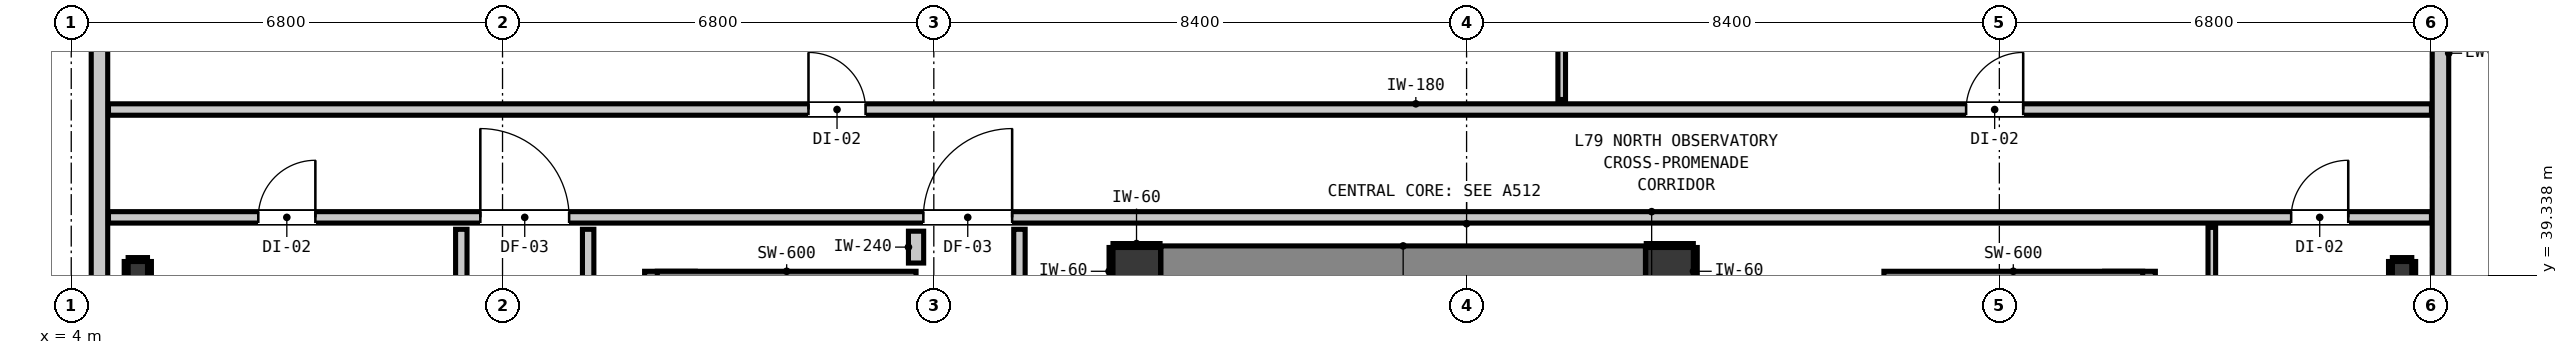
"""IFC4 building model, lengths in metres.
Left out: names, types, materials, properties, quantities, classifications, styles, units other than length and angle.
Written with IfcOpenShell. Run it as: python <this file> out.ifc"""

import sys

from ifc_helpers import new_model, si_unit, direction, frame, frame_2d, origin, origin_2d, place, context, subcontext, project, spatial, rectangle, i_section, extrude, element, fill, save


model = new_model("IFC4")
c1 = context("Model", 3, precision=1e-05, world=origin(), true_north=direction((0.0, 1.0)))
c2 = subcontext(c1, "Body", "Model", "MODEL_VIEW")
j1 = project(units=[si_unit("LENGTHUNIT", "METRE"), si_unit("PLANEANGLEUNIT", "RADIAN")], contexts=[c1])
p1 = place(None, origin())
s1 = spatial("IfcSite", under=j1, at=p1, CompositionType="ELEMENT")
p2 = place(p1, origin())
s2 = spatial("IfcBuilding", under=s1, at=p2, CompositionType="ELEMENT")
p3 = place(p2, frame((0.0, 0.0, 273.48)))
s3 = spatial("IfcBuildingStorey", under=s2, at=p3, CompositionType="ELEMENT", Elevation=273.48)
for number, where, z_axis, x_axis in (
    (1, (20.8, 39.4, 0.0), (0.0, 0.0, 1.0), (1.0, 0.0, 0.0)),
    (2, (29.2, 39.4, 0.0), (0.0, 0.0, 1.0), (1.0, 0.0, 0.0)),
):
    element("IfcColumn", number, at=place(p3, frame(where, z_axis=z_axis, x_axis=x_axis)), inside=s3, PredefinedType="COLUMN", context=c2, shape_type="SweptSolid", body=[
        extrude(rectangle(XDim=0.75, YDim=0.75, at=origin_2d()), origin(), (0.0, 0.0, 1.0), 4.18),
    ])
p4 = place(p3, frame((13.44, 31.08, 0.0), z_axis=(0.0, 0.0, 1.0), x_axis=(0.0, 1.0, 0.0)))
e3 = element("IfcWall", 3, at=p4, inside=s3, PredefinedType="SHEAR", context=c2, shape_type="SweptSolid", body=[
    extrude(rectangle(XDim=8.32, YDim=0.8, at=frame_2d((4.16, 0.0))), origin(), (0.0, 0.0, 1.0), 4.6),
])
p5 = place(p3, frame((13.24, 39.1, 0.0), z_axis=(0.0, 0.0, 1.0), x_axis=(1.0, 0.0, 0.0)))
e4 = element("IfcWall", 4, at=p5, inside=s3, PredefinedType="SHEAR", context=c2, shape_type="SweptSolid", body=[
    extrude(rectangle(XDim=4.08, YDim=0.6, at=frame_2d((2.04, 0.0))), origin(), (0.0, 0.0, 1.0), 4.6),
])
p6 = place(p3, frame((36.46, 31.08, 0.0), z_axis=(0.0, 0.0, 1.0), x_axis=(0.0, 1.0, 0.0)))
e5 = element("IfcWall", 5, at=p6, inside=s3, PredefinedType="SHEAR", context=c2, shape_type="SweptSolid", body=[
    extrude(rectangle(XDim=8.32, YDim=0.8, at=frame_2d((4.16, 0.0))), origin(), (0.0, 0.0, 1.0), 4.6),
])
p7 = place(p3, frame((32.58, 39.1, 0.0), z_axis=(0.0, 0.0, 1.0), x_axis=(1.0, 0.0, 0.0)))
e6 = element("IfcWall", 6, at=p7, inside=s3, PredefinedType="SHEAR", context=c2, shape_type="SweptSolid", body=[
    extrude(rectangle(XDim=4.08, YDim=0.6, at=frame_2d((2.04, 0.0))), origin(), (0.0, 0.0, 1.0), 4.6),
])
p8 = place(p3, frame((21.18, 39.4, 0.0), z_axis=(0.0, 0.0, 1.0), x_axis=(1.0, 0.0, 0.0)))
e7 = element("IfcWall", 7, at=p8, inside=s3, PredefinedType="SHEAR", context=c2, shape_type="SweptSolid", body=[
    extrude(rectangle(XDim=7.64, YDim=0.8, at=frame_2d((3.82, 0.0))), origin(), (0.0, 0.0, 1.0), 4.6),
])
for number, where, z_axis, x_axis in (
    (8, (5.05, 39.4, 0.0), (0.0, 0.0, 1.0), (1.0, 0.0, 0.0)),
    (9, (40.75, 39.4, 0.0), (0.0, 0.0, 1.0), (1.0, 0.0, 0.0)),
):
    element("IfcColumn", number, at=place(p3, frame(where, z_axis=z_axis, x_axis=x_axis)), inside=s3, PredefinedType="COLUMN", context=c2, shape_type="SweptSolid", body=[
        extrude(i_section(OverallWidth=0.305, OverallDepth=0.308, WebThickness=0.01, FlangeThickness=0.015, at=origin_2d()), origin(), (0.0, 0.0, 1.0), 4.18),
    ])
p9 = place(p3, frame((4.445, 18.545, 0.0), z_axis=(0.0, 0.0, 1.0), x_axis=(0.0, 1.0, 0.0)))
e10 = element("IfcWall", 10, at=p9, inside=s3, PredefinedType="STANDARD", context=c2, shape_type="SweptSolid", body=[
    extrude(rectangle(XDim=30.31, YDim=0.26, at=frame_2d((15.155, 0.0))), origin(), (0.0, 0.0, 1.0), 4.18),
])
p10 = place(p9, frame((25.512, 0.0, 0.85)))
e11 = element("IfcOpeningElement", 11, at=p10, cuts=e10, PredefinedType="OPENING", context=c2, shape_type="SweptSolid", body=[
    extrude(rectangle(XDim=2.7, YDim=2.0, at=frame_2d((1.35, 1.0))), frame((0.0, 0.14, 0.0), z_axis=(0.0, -1.0, 0.0), x_axis=(1.0, 0.0, 0.0)), (0.0, 0.0, 1.0), 0.28),
])
p11 = place(p3, frame((41.355, 48.855, 0.0), z_axis=(0.0, 0.0, 1.0), x_axis=(0.0, -1.0, 0.0)))
e12 = element("IfcWall", 12, at=p11, inside=s3, PredefinedType="STANDARD", context=c2, shape_type="SweptSolid", body=[
    extrude(rectangle(XDim=30.31, YDim=0.26, at=frame_2d((15.155, 0.0))), origin(), (0.0, 0.0, 1.0), 4.18),
])
p12 = place(p11, frame((21.155, 0.0, 0.85)))
e13 = element("IfcOpeningElement", 13, at=p12, cuts=e12, PredefinedType="OPENING", context=c2, shape_type="SweptSolid", body=[
    extrude(rectangle(XDim=2.7, YDim=2.0, at=frame_2d((1.35, 1.0))), frame((0.0, 0.14, 0.0), z_axis=(0.0, -1.0, 0.0), x_axis=(1.0, 0.0, 0.0)), (0.0, 0.0, 1.0), 0.28),
])
p13 = place(p11, frame((12.135, 0.0, 0.85)))
e14 = element("IfcOpeningElement", 14, at=p13, cuts=e12, PredefinedType="OPENING", context=c2, shape_type="SweptSolid", body=[
    extrude(rectangle(XDim=2.7, YDim=2.0, at=frame_2d((1.35, 1.0))), frame((0.0, 0.14, 0.0), z_axis=(0.0, -1.0, 0.0), x_axis=(1.0, 0.0, 0.0)), (0.0, 0.0, 1.0), 0.28),
])
p14 = place(p3, frame((4.587, 40.25, 0.0), z_axis=(0.0, 0.0, 1.0), x_axis=(1.0, 0.0, 0.0)))
e15 = element("IfcWall", 15, at=p14, inside=s3, PredefinedType="PARTITIONING", context=c2, shape_type="SweptSolid", body=[
    extrude(rectangle(XDim=36.626, YDim=0.18, at=frame_2d((18.313, 0.0))), origin(), (0.0, 0.0, 1.0), 4.18),
])
p15 = place(p14, frame((12.848, 0.0, 0.0)))
e16 = element("IfcOpeningElement", 16, at=p15, cuts=e15, PredefinedType="OPENING", context=c2, shape_type="SweptSolid", body=[
    extrude(rectangle(XDim=1.4, YDim=2.15, at=frame_2d((0.7, 1.075))), frame((0.0, 0.1, 0.0), z_axis=(0.0, -1.0, 0.0), x_axis=(1.0, 0.0, 0.0)), (0.0, 0.0, 1.0), 0.2),
])
p16 = place(p14, frame((5.863, 0.0, 0.0)))
e17 = element("IfcOpeningElement", 17, at=p16, cuts=e15, PredefinedType="OPENING", context=c2, shape_type="SweptSolid", body=[
    extrude(rectangle(XDim=1.4, YDim=2.15, at=frame_2d((0.7, 1.075))), frame((0.0, 0.1, 0.0), z_axis=(0.0, -1.0, 0.0), x_axis=(1.0, 0.0, 0.0)), (0.0, 0.0, 1.0), 0.2),
])
p17 = place(p14, frame((2.362, 0.0, 0.0)))
e18 = element("IfcOpeningElement", 18, at=p17, cuts=e15, PredefinedType="OPENING", context=c2, shape_type="SweptSolid", body=[
    extrude(rectangle(XDim=0.9, YDim=2.1, at=frame_2d((0.45, 1.05))), frame((0.0, 0.1, 0.0), z_axis=(0.0, -1.0, 0.0), x_axis=(1.0, 0.0, 0.0)), (0.0, 0.0, 1.0), 0.2),
])
p18 = place(p14, frame((34.414, 0.0, 0.0)))
e19 = element("IfcOpeningElement", 19, at=p18, cuts=e15, PredefinedType="OPENING", context=c2, shape_type="SweptSolid", body=[
    extrude(rectangle(XDim=0.9, YDim=2.1, at=frame_2d((0.45, 1.05))), frame((0.0, 0.1, 0.0), z_axis=(0.0, -1.0, 0.0), x_axis=(1.0, 0.0, 0.0)), (0.0, 0.0, 1.0), 0.2),
])
p19 = place(p3, frame((4.587, 41.95, 0.0), z_axis=(0.0, 0.0, 1.0), x_axis=(1.0, 0.0, 0.0)))
e20 = element("IfcWall", 20, at=p19, inside=s3, PredefinedType="PARTITIONING", context=c2, shape_type="SweptSolid", body=[
    extrude(rectangle(XDim=36.626, YDim=0.18, at=frame_2d((18.313, 0.0))), origin(), (0.0, 0.0, 1.0), 4.18),
])
p20 = place(p19, frame((11.037, 0.0, 0.0)))
e21 = element("IfcOpeningElement", 21, at=p20, cuts=e20, PredefinedType="OPENING", context=c2, shape_type="SweptSolid", body=[
    extrude(rectangle(XDim=0.9, YDim=2.1, at=frame_2d((0.45, 1.05))), frame((0.0, 0.1, 0.0), z_axis=(0.0, -1.0, 0.0), x_axis=(1.0, 0.0, 0.0)), (0.0, 0.0, 1.0), 0.2),
])
p21 = place(p19, frame((29.289, 0.0, 0.0)))
e22 = element("IfcOpeningElement", 22, at=p21, cuts=e20, PredefinedType="OPENING", context=c2, shape_type="SweptSolid", body=[
    extrude(rectangle(XDim=0.9, YDim=2.1, at=frame_2d((0.45, 1.05))), frame((0.0, 0.1, 0.0), z_axis=(0.0, -1.0, 0.0), x_axis=(1.0, 0.0, 0.0)), (0.0, 0.0, 1.0), 0.2),
])
p22 = place(p3, frame((17.32, 39.53, 0.0), z_axis=(0.0, 0.0, 1.0), x_axis=(0.0, 1.0, 0.0)))
e23 = element("IfcWall", 23, at=p22, inside=s3, PredefinedType="PARTITIONING", context=c2, shape_type="SweptSolid", body=[
    extrude(rectangle(XDim=0.502, YDim=0.24, at=frame_2d((0.251, 0.0))), origin(), (0.0, 0.0, 1.0), 4.18),
])
p23 = place(p3, frame((10.15, 35.368, 0.0), z_axis=(0.0, 0.0, 1.0), x_axis=(0.0, 1.0, 0.0)))
e24 = element("IfcWall", 24, at=p23, inside=s3, PredefinedType="PARTITIONING", context=c2, shape_type="SweptSolid", body=[
    extrude(rectangle(XDim=4.694, YDim=0.18, at=frame_2d((2.347, 0.0))), origin(), (0.0, 0.0, 1.0), 4.18),
])
p24 = place(p3, frame((12.15, 21.368, 0.0), z_axis=(0.0, 0.0, 1.0), x_axis=(0.0, 1.0, 0.0)))
e25 = element("IfcWall", 25, at=p24, inside=s3, PredefinedType="PARTITIONING", context=c2, shape_type="SweptSolid", body=[
    extrude(rectangle(XDim=18.694, YDim=0.18, at=frame_2d((9.347, 0.0))), origin(), (0.0, 0.0, 1.0), 4.18),
])
p25 = place(p3, frame((18.95, 39.058, 0.0), z_axis=(0.0, 0.0, 1.0), x_axis=(0.0, 1.0, 0.0)))
e26 = element("IfcWall", 26, at=p25, inside=s3, PredefinedType="PARTITIONING", context=c2, shape_type="SweptSolid", body=[
    extrude(rectangle(XDim=1.004, YDim=0.18, at=frame_2d((0.502, 0.0))), origin(), (0.0, 0.0, 1.0), 4.18),
])
p26 = place(p3, frame((27.5, 42.108, 0.0), z_axis=(0.0, 0.0, 1.0), x_axis=(0.0, 1.0, 0.0)))
e27 = element("IfcWall", 27, at=p26, inside=s3, PredefinedType="PARTITIONING", context=c2, shape_type="SweptSolid", body=[
    extrude(rectangle(XDim=8.705, YDim=0.12, at=frame_2d((4.353, 0.0))), origin(), (0.0, 0.0, 1.0), 4.18),
])
p27 = place(p3, frame((37.75, 31.808, 0.0), z_axis=(0.0, 0.0, 1.0), x_axis=(0.0, 1.0, 0.0)))
e28 = element("IfcWall", 28, at=p27, inside=s3, PredefinedType="PARTITIONING", context=c2, shape_type="SweptSolid", body=[
    extrude(rectangle(XDim=8.284, YDim=0.12, at=frame_2d((4.142, 0.0))), origin(), (0.0, 0.0, 1.0), 4.18),
])
p28 = place(p3, frame((20.425, 39.807, 0.0), z_axis=(0.0, 0.0, 1.0), x_axis=(1.0, 0.0, 0.0)))
e29 = element("IfcWall", 29, at=p28, inside=s3, PredefinedType="PARTITIONING", context=c2, shape_type="SweptSolid", body=[
    extrude(rectangle(XDim=0.742, YDim=0.06, at=frame_2d((0.371, 0.0))), origin(), (0.0, 0.0, 1.0), 1.45),
])
p29 = place(p3, frame((20.393, 39.025, 0.0), z_axis=(0.0, 0.0, 1.0), x_axis=(0.0, 1.0, 0.0)))
e30 = element("IfcWall", 30, at=p29, inside=s3, PredefinedType="PARTITIONING", context=c2, shape_type="SweptSolid", body=[
    extrude(rectangle(XDim=0.75, YDim=0.06, at=frame_2d((0.375, 0.0))), origin(), (0.0, 0.0, 1.0), 1.45),
])
p30 = place(p3, frame((28.833, 39.807, 0.0), z_axis=(0.0, 0.0, 1.0), x_axis=(1.0, 0.0, 0.0)))
e31 = element("IfcWall", 31, at=p30, inside=s3, PredefinedType="PARTITIONING", context=c2, shape_type="SweptSolid", body=[
    extrude(rectangle(XDim=0.742, YDim=0.06, at=frame_2d((0.371, 0.0))), origin(), (0.0, 0.0, 1.0), 1.45),
])
p31 = place(p3, frame((29.607, 39.025, 0.0), z_axis=(0.0, 0.0, 1.0), x_axis=(0.0, 1.0, 0.0)))
e32 = element("IfcWall", 32, at=p31, inside=s3, PredefinedType="PARTITIONING", context=c2, shape_type="SweptSolid", body=[
    extrude(rectangle(XDim=0.75, YDim=0.06, at=frame_2d((0.375, 0.0))), origin(), (0.0, 0.0, 1.0), 1.45),
])
p32 = place(p3, frame((4.897, 39.586, 0.0), z_axis=(0.0, 0.0, 1.0), x_axis=(1.0, 0.0, 0.0)))
e33 = element("IfcWall", 33, at=p32, inside=s3, PredefinedType="PARTITIONING", context=c2, shape_type="SweptSolid", body=[
    extrude(rectangle(XDim=0.305, YDim=0.06, at=frame_2d((0.152, 0.0))), origin(), (0.0, 0.0, 1.0), 1.45),
])
for number, where, z_axis, x_axis in (
    (34, (4.865, 39.246, 0.0), (0.0, 0.0, 1.0), (0.0, 1.0, 0.0)),
    (35, (5.234, 39.246, 0.0), (0.0, 0.0, 1.0), (0.0, 1.0, 0.0)),
):
    element("IfcWall", number, at=place(p3, frame(where, z_axis=z_axis, x_axis=x_axis)), inside=s3, PredefinedType="PARTITIONING", context=c2, shape_type="SweptSolid", body=[
        extrude(rectangle(XDim=0.308, YDim=0.06, at=frame_2d((0.154, 0.0))), origin(), (0.0, 0.0, 1.0), 1.45),
    ])
p33 = place(p3, frame((40.597, 39.586, 0.0), z_axis=(0.0, 0.0, 1.0), x_axis=(1.0, 0.0, 0.0)))
e36 = element("IfcWall", 36, at=p33, inside=s3, PredefinedType="PARTITIONING", context=c2, shape_type="SweptSolid", body=[
    extrude(rectangle(XDim=0.306, YDim=0.06, at=frame_2d((0.153, 0.0))), origin(), (0.0, 0.0, 1.0), 1.45),
])
for number, where, z_axis, x_axis in (
    (37, (40.566, 39.246, 0.0), (0.0, 0.0, 1.0), (0.0, 1.0, 0.0)),
    (38, (40.934, 39.246, 0.0), (0.0, 0.0, 1.0), (0.0, 1.0, 0.0)),
):
    element("IfcWall", number, at=place(p3, frame(where, z_axis=z_axis, x_axis=x_axis)), inside=s3, PredefinedType="PARTITIONING", context=c2, shape_type="SweptSolid", body=[
        extrude(rectangle(XDim=0.308, YDim=0.06, at=frame_2d((0.154, 0.0))), origin(), (0.0, 0.0, 1.0), 1.45),
    ])
p34 = place(p15, origin())
e39 = element("IfcDoor", 39, at=p34, inside=s3, OperationType="SINGLE_SWING_RIGHT", PredefinedType="DOOR", context=c2, shape_type="SweptSolid", body=[
    extrude(rectangle(XDim=1.4, YDim=2.15, at=frame_2d((0.7, 1.075))), frame((0.0, 0.025, 0.0), z_axis=(0.0, -1.0, 0.0), x_axis=(1.0, 0.0, 0.0)), (0.0, 0.0, 1.0), 0.05),
])
fill(e16, e39)
p35 = place(p16, origin())
e40 = element("IfcDoor", 40, at=p35, inside=s3, OperationType="SINGLE_SWING_LEFT", PredefinedType="DOOR", context=c2, shape_type="SweptSolid", body=[
    extrude(rectangle(XDim=1.4, YDim=2.15, at=frame_2d((0.7, 1.075))), frame((0.0, 0.025, 0.0), z_axis=(0.0, -1.0, 0.0), x_axis=(1.0, 0.0, 0.0)), (0.0, 0.0, 1.0), 0.05),
])
fill(e17, e40)
p36 = place(p20, origin())
e41 = element("IfcDoor", 41, at=p36, inside=s3, OperationType="SINGLE_SWING_LEFT", PredefinedType="DOOR", context=c2, shape_type="SweptSolid", body=[
    extrude(rectangle(XDim=0.9, YDim=2.1, at=frame_2d((0.45, 1.05))), frame((0.0, 0.025, 0.0), z_axis=(0.0, -1.0, 0.0), x_axis=(1.0, 0.0, 0.0)), (0.0, 0.0, 1.0), 0.05),
])
fill(e21, e41)
p37 = place(p21, origin())
e42 = element("IfcDoor", 42, at=p37, inside=s3, OperationType="SINGLE_SWING_RIGHT", PredefinedType="DOOR", context=c2, shape_type="SweptSolid", body=[
    extrude(rectangle(XDim=0.9, YDim=2.1, at=frame_2d((0.45, 1.05))), frame((0.0, 0.025, 0.0), z_axis=(0.0, -1.0, 0.0), x_axis=(1.0, 0.0, 0.0)), (0.0, 0.0, 1.0), 0.05),
])
fill(e22, e42)
p38 = place(p17, origin())
e43 = element("IfcDoor", 43, at=p38, inside=s3, OperationType="SINGLE_SWING_RIGHT", PredefinedType="DOOR", context=c2, shape_type="SweptSolid", body=[
    extrude(rectangle(XDim=0.9, YDim=2.1, at=frame_2d((0.45, 1.05))), frame((0.0, 0.025, 0.0), z_axis=(0.0, -1.0, 0.0), x_axis=(1.0, 0.0, 0.0)), (0.0, 0.0, 1.0), 0.05),
])
fill(e18, e43)
p39 = place(p18, origin())
e44 = element("IfcDoor", 44, at=p39, inside=s3, OperationType="SINGLE_SWING_RIGHT", PredefinedType="DOOR", context=c2, shape_type="SweptSolid", body=[
    extrude(rectangle(XDim=0.9, YDim=2.1, at=frame_2d((0.45, 1.05))), frame((0.0, 0.025, 0.0), z_axis=(0.0, -1.0, 0.0), x_axis=(1.0, 0.0, 0.0)), (0.0, 0.0, 1.0), 0.05),
])
fill(e19, e44)
save(model, sys.argv[1])
